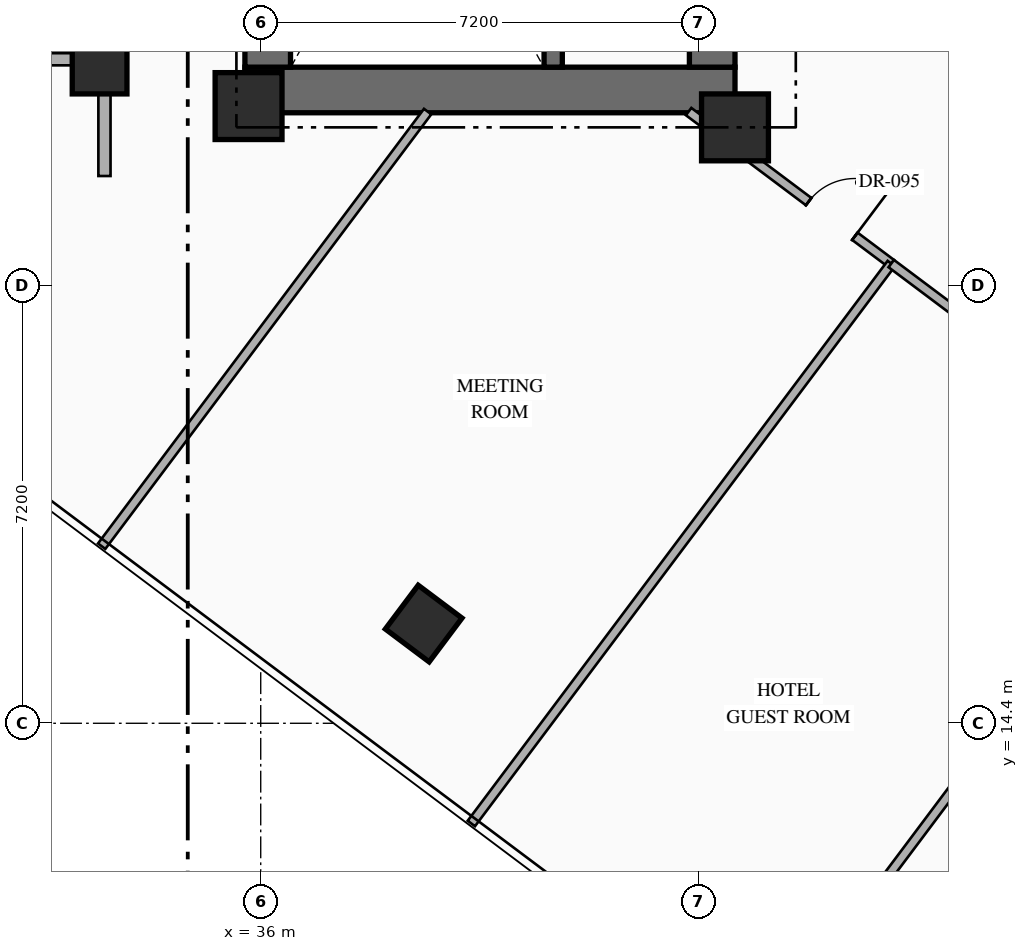
"""IFC4 building model, lengths in metres.
Left out: names, types, materials, properties, quantities, classifications, styles, units other than length and angle.
Written with IfcOpenShell. Run it as: python <this file> out.ifc"""

import sys

from ifc_helpers import new_model, si_unit, direction, frame, frame_2d, origin, origin_2d, place, context, subcontext, project, spatial, rectangle, hollow_rectangle, extrude, element, fill, save


model = new_model("IFC4")
c1 = context("Model", 3, precision=1e-05, world=origin(), true_north=direction((0.0, 1.0)))
c2 = subcontext(c1, "Body", "Model", "MODEL_VIEW")
j1 = project(units=[si_unit("LENGTHUNIT", "METRE"), si_unit("PLANEANGLEUNIT", "RADIAN")], contexts=[c1])
p1 = place(None, origin())
s1 = spatial("IfcSite", under=j1, at=p1, CompositionType="ELEMENT")
p2 = place(p1, origin())
s2 = spatial("IfcBuilding", under=s1, at=p2, CompositionType="ELEMENT")
p3 = place(p2, frame((0.0, 0.0, 88.0)))
s3 = spatial("IfcBuildingStorey", under=s2, at=p3, CompositionType="ELEMENT", Elevation=88.0)
p4 = place(p3, frame((35.74, 24.815, 0.0), z_axis=(0.0, 0.0, 1.0), x_axis=(1.0, 0.0, 0.0)))
e1 = element("IfcWall", 1, at=p4, inside=s3, PredefinedType="SHEAR", context=c2, shape_type="SweptSolid", body=[
    extrude(rectangle(XDim=8.06, YDim=0.75, at=frame_2d((4.03, 0.0))), origin(), (0.0, 0.0, 1.0), 3.35),
])
p5 = place(p3, frame((36.115, 25.19, 0.0), z_axis=(0.0, 0.0, 1.0), x_axis=(0.0, 1.0, 0.0)))
e2 = element("IfcWall", 2, at=p5, inside=s3, PredefinedType="SHEAR", context=c2, shape_type="SweptSolid", body=[
    extrude(rectangle(XDim=9.48, YDim=0.75, at=frame_2d((4.74, 0.0))), origin(), (0.0, 0.0, 1.0), 3.35),
])
p6 = place(p3, frame((43.425, 25.19, 0.0), z_axis=(0.0, 0.0, 1.0), x_axis=(0.0, 1.0, 0.0)))
e3 = element("IfcWall", 3, at=p6, inside=s3, PredefinedType="SHEAR", context=c2, shape_type="SweptSolid", body=[
    extrude(rectangle(XDim=9.48, YDim=0.75, at=frame_2d((4.74, 0.0))), origin(), (0.0, 0.0, 1.0), 3.35),
])
p7 = place(p6, frame((1.21, 0.0, 0.0)))
e4 = element("IfcOpeningElement", 4, at=p7, cuts=e3, PredefinedType="OPENING", context=c2, shape_type="SweptSolid", body=[
    extrude(rectangle(XDim=0.85, YDim=2.08, at=frame_2d((0.425, 1.04))), frame((0.0, 0.385, 0.0), z_axis=(0.0, -1.0, 0.0), x_axis=(1.0, 0.0, 0.0)), (0.0, 0.0, 1.0), 0.77),
])
p8 = place(p6, frame((4.46, 0.0, 0.0)))
e5 = element("IfcOpeningElement", 5, at=p8, cuts=e3, PredefinedType="OPENING", context=c2, shape_type="SweptSolid", body=[
    extrude(rectangle(XDim=0.85, YDim=2.08, at=frame_2d((0.425, 1.04))), frame((0.0, 0.385, 0.0), z_axis=(0.0, -1.0, 0.0), x_axis=(1.0, 0.0, 0.0)), (0.0, 0.0, 1.0), 0.77),
])
p9 = place(p3, frame((40.81, 25.19, 0.0), z_axis=(0.0, 0.0, 1.0), x_axis=(0.0, 1.0, 0.0)))
e6 = element("IfcWall", 6, at=p9, inside=s3, PredefinedType="SHEAR", context=c2, shape_type="SweptSolid", body=[
    extrude(rectangle(XDim=9.48, YDim=0.3, at=frame_2d((4.74, 0.0))), origin(), (0.0, 0.0, 1.0), 3.35),
])
for number, where, z_axis, x_axis in (
    (7, (35.8, 24.55, 0.0), (0.0, 0.0, 1.0), (1.0, 0.0, 0.0)),
    (8, (43.8, 24.2, 0.0), (0.0, 0.0, 1.0), (1.0, 0.0, 0.0)),
):
    element("IfcColumn", number, at=place(p3, frame(where, z_axis=z_axis, x_axis=x_axis)), inside=s3, PredefinedType="COLUMN", context=c2, shape_type="SweptSolid", body=[
        extrude(rectangle(XDim=1.1, YDim=1.1, at=origin_2d()), origin(), (0.0, 0.0, 1.0), 3.35),
    ])
for number, where, z_axis, x_axis in (
    (9, (33.35, 25.2, 0.0), (0.0, 0.0, 1.0), (1.0, 0.0, 0.0)),
    (10, (38.68, 16.04, 0.0), (0.0, 0.0, 1.0), (0.8, -0.6, 0.0)),
):
    element("IfcColumn", number, at=place(p3, frame(where, z_axis=z_axis, x_axis=x_axis)), inside=s3, PredefinedType="COLUMN", context=c2, shape_type="SweptSolid", body=[
        extrude(hollow_rectangle(XDim=0.9, YDim=0.9, WallThickness=0.036, at=origin_2d()), origin(), (0.0, 0.0, 1.0), 3.35),
    ])
p10 = place(p3, frame((44.86, 40.73, 0.0), z_axis=(0.0, 0.0, 1.0), x_axis=(0.800006902154, -0.599990797017, 0.0)))
e11 = element("IfcWall", 11, at=p10, inside=s3, PredefinedType="STANDARD", context=c2, shape_type="SweptSolid", body=[
    extrude(rectangle(XDim=29.712, YDim=0.28, at=frame_2d((14.856, 0.0))), origin(), (0.0, 0.0, 1.0), 3.05),
])
p11 = place(p10, frame((14.249, 0.0, 0.0)))
e12 = element("IfcOpeningElement", 12, at=p11, cuts=e11, PredefinedType="OPENING", context=c2, shape_type="SweptSolid", body=[
    extrude(rectangle(XDim=1.1, YDim=2.2, at=frame_2d((0.55, 1.1))), frame((0.0, 0.15, 0.0), z_axis=(0.0, -1.0, 0.0), x_axis=(1.0, 0.0, 0.0)), (0.0, 0.0, 1.0), 0.3),
])
p12 = place(p10, frame((1.612, 0.0, 0.85)))
e13 = element("IfcOpeningElement", 13, at=p12, cuts=e11, PredefinedType="OPENING", context=c2, shape_type="SweptSolid", body=[
    extrude(rectangle(XDim=1.4, YDim=1.8, at=frame_2d((0.7, 0.9))), frame((0.0, 0.15, 0.0), z_axis=(0.0, -1.0, 0.0), x_axis=(1.0, 0.0, 0.0)), (0.0, 0.0, 1.0), 0.3),
])
p13 = place(p10, frame((5.667, 0.0, 0.85)))
e14 = element("IfcOpeningElement", 14, at=p13, cuts=e11, PredefinedType="OPENING", context=c2, shape_type="SweptSolid", body=[
    extrude(rectangle(XDim=1.4, YDim=1.8, at=frame_2d((0.7, 0.9))), frame((0.0, 0.15, 0.0), z_axis=(0.0, -1.0, 0.0), x_axis=(1.0, 0.0, 0.0)), (0.0, 0.0, 1.0), 0.3),
])
p14 = place(p10, frame((9.912, 0.0, 0.85)))
e15 = element("IfcOpeningElement", 15, at=p14, cuts=e11, PredefinedType="OPENING", context=c2, shape_type="SweptSolid", body=[
    extrude(rectangle(XDim=1.4, YDim=1.8, at=frame_2d((0.7, 0.9))), frame((0.0, 0.15, 0.0), z_axis=(0.0, -1.0, 0.0), x_axis=(1.0, 0.0, 0.0)), (0.0, 0.0, 1.0), 0.3),
])
p15 = place(p10, frame((19.528, 0.0, 0.85)))
e16 = element("IfcOpeningElement", 16, at=p15, cuts=e11, PredefinedType="OPENING", context=c2, shape_type="SweptSolid", body=[
    extrude(rectangle(XDim=1.4, YDim=1.8, at=frame_2d((0.7, 0.9))), frame((0.0, 0.15, 0.0), z_axis=(0.0, -1.0, 0.0), x_axis=(1.0, 0.0, 0.0)), (0.0, 0.0, 1.0), 0.3),
])
p16 = place(p10, frame((23.451, 0.0, 0.85)))
e17 = element("IfcOpeningElement", 17, at=p16, cuts=e11, PredefinedType="OPENING", context=c2, shape_type="SweptSolid", body=[
    extrude(rectangle(XDim=1.4, YDim=1.8, at=frame_2d((0.7, 0.9))), frame((0.0, 0.15, 0.0), z_axis=(0.0, -1.0, 0.0), x_axis=(1.0, 0.0, 0.0)), (0.0, 0.0, 1.0), 0.3),
])
p17 = place(p10, frame((27.852, 0.0, 0.85)))
e18 = element("IfcOpeningElement", 18, at=p17, cuts=e11, PredefinedType="OPENING", context=c2, shape_type="SweptSolid", body=[
    extrude(rectangle(XDim=1.4, YDim=1.8, at=frame_2d((0.7, 0.9))), frame((0.0, 0.15, 0.0), z_axis=(0.0, -1.0, 0.0), x_axis=(1.0, 0.0, 0.0)), (0.0, 0.0, 1.0), 0.3),
])
p18 = place(p3, frame((33.43, 23.4, 0.0), z_axis=(0.0, 0.0, 1.0), x_axis=(0.0, 1.0, 0.0)))
e19 = element("IfcWall", 19, at=p18, inside=s3, PredefinedType="STANDARD", context=c2, shape_type="SweptSolid", body=[
    extrude(rectangle(XDim=4.08, YDim=0.2, at=frame_2d((2.04, 0.0))), origin(), (0.0, 0.0, 1.0), 2.345),
])
p19 = place(p3, frame((25.55, 25.32, 0.0), z_axis=(0.0, 0.0, 1.0), x_axis=(1.0, 0.0, 0.0)))
e20 = element("IfcWall", 20, at=p19, inside=s3, PredefinedType="STANDARD", context=c2, shape_type="SweptSolid", body=[
    extrude(rectangle(XDim=7.88, YDim=0.2, at=frame_2d((3.94, 0.0))), origin(), (0.0, 0.0, 1.0), 2.445),
])
p20 = place(p3, frame((43.037, 24.46, 0.0), z_axis=(0.0, 0.0, 1.0), x_axis=(0.799971872363, -0.600037501685, 0.0)))
e21 = element("IfcWall", 21, at=p20, inside=s3, PredefinedType="PARTITIONING", context=c2, shape_type="SweptSolid", body=[
    extrude(rectangle(XDim=4.167, YDim=0.15, at=frame_2d((2.083, 0.0))), origin(), (0.0, 0.0, 1.0), 2.345),
])
p21 = place(p20, frame((2.468, 0.0, 0.0)))
e22 = element("IfcOpeningElement", 22, at=p21, cuts=e21, PredefinedType="OPENING", context=c2, shape_type="SweptSolid", body=[
    extrude(rectangle(XDim=0.95, YDim=2.15, at=frame_2d((0.475, 1.075))), frame((0.0, 0.085, 0.0), z_axis=(0.0, -1.0, 0.0), x_axis=(1.0, 0.0, 0.0)), (0.0, 0.0, 1.0), 0.17),
])
p22 = place(p3, frame((33.384, 17.312, 0.0), z_axis=(0.0, 0.0, 1.0), x_axis=(0.600008743659, 0.799993442181, 0.0)))
e23 = element("IfcWall", 23, at=p22, inside=s3, PredefinedType="PARTITIONING", context=c2, shape_type="SweptSolid", body=[
    extrude(rectangle(XDim=8.935, YDim=0.15, at=frame_2d((4.468, 0.0))), origin(), (0.0, 0.0, 1.0), 3.05),
])
p23 = place(p3, frame((39.464, 12.752, 0.0), z_axis=(0.0, 0.0, 1.0), x_axis=(0.6, 0.8, 0.0)))
e24 = element("IfcWall", 24, at=p23, inside=s3, PredefinedType="PARTITIONING", context=c2, shape_type="SweptSolid", body=[
    extrude(rectangle(XDim=11.51, YDim=0.15, at=frame_2d((5.755, 0.0))), origin(), (0.0, 0.0, 1.0), 3.05),
])
p24 = place(p3, frame((46.37, 21.96, 0.0), z_axis=(0.0, 0.0, 1.0), x_axis=(0.799977170108, -0.600030438649, 0.0)))
e25 = element("IfcWall", 25, at=p24, inside=s3, PredefinedType="PARTITIONING", context=c2, shape_type="SweptSolid", body=[
    extrude(rectangle(XDim=3.85, YDim=0.15, at=frame_2d((1.925, 0.0))), origin(), (0.0, 0.0, 1.0), 2.345),
])
p25 = place(p24, frame((1.45, 0.0, 0.0)))
e26 = element("IfcOpeningElement", 26, at=p25, cuts=e25, PredefinedType="OPENING", context=c2, shape_type="SweptSolid", body=[
    extrude(rectangle(XDim=0.95, YDim=2.15, at=frame_2d((0.475, 1.075))), frame((0.0, 0.085, 0.0), z_axis=(0.0, -1.0, 0.0), x_axis=(1.0, 0.0, 0.0)), (0.0, 0.0, 1.0), 0.17),
])
p26 = place(p3, frame((44.36, 9.28, 0.0), z_axis=(0.0, 0.0, 1.0), x_axis=(0.599986233332, 0.800010324816, 0.0)))
e27 = element("IfcWall", 27, at=p26, inside=s3, PredefinedType="PARTITIONING", context=c2, shape_type="SweptSolid", body=[
    extrude(rectangle(XDim=11.35, YDim=0.15, at=frame_2d((5.675, 0.0))), origin(), (0.0, 0.0, 1.0), 2.345),
])
p27 = place(p21, origin())
e28 = element("IfcDoor", 28, at=p27, inside=s3, OperationType="SINGLE_SWING_RIGHT", PredefinedType="DOOR", context=c2, shape_type="SweptSolid", body=[
    extrude(rectangle(XDim=0.95, YDim=2.15, at=frame_2d((0.475, 1.075))), frame((0.0, 0.025, 0.0), z_axis=(0.0, -1.0, 0.0), x_axis=(1.0, 0.0, 0.0)), (0.0, 0.0, 1.0), 0.05),
])
fill(e22, e28)
save(model, sys.argv[1])
